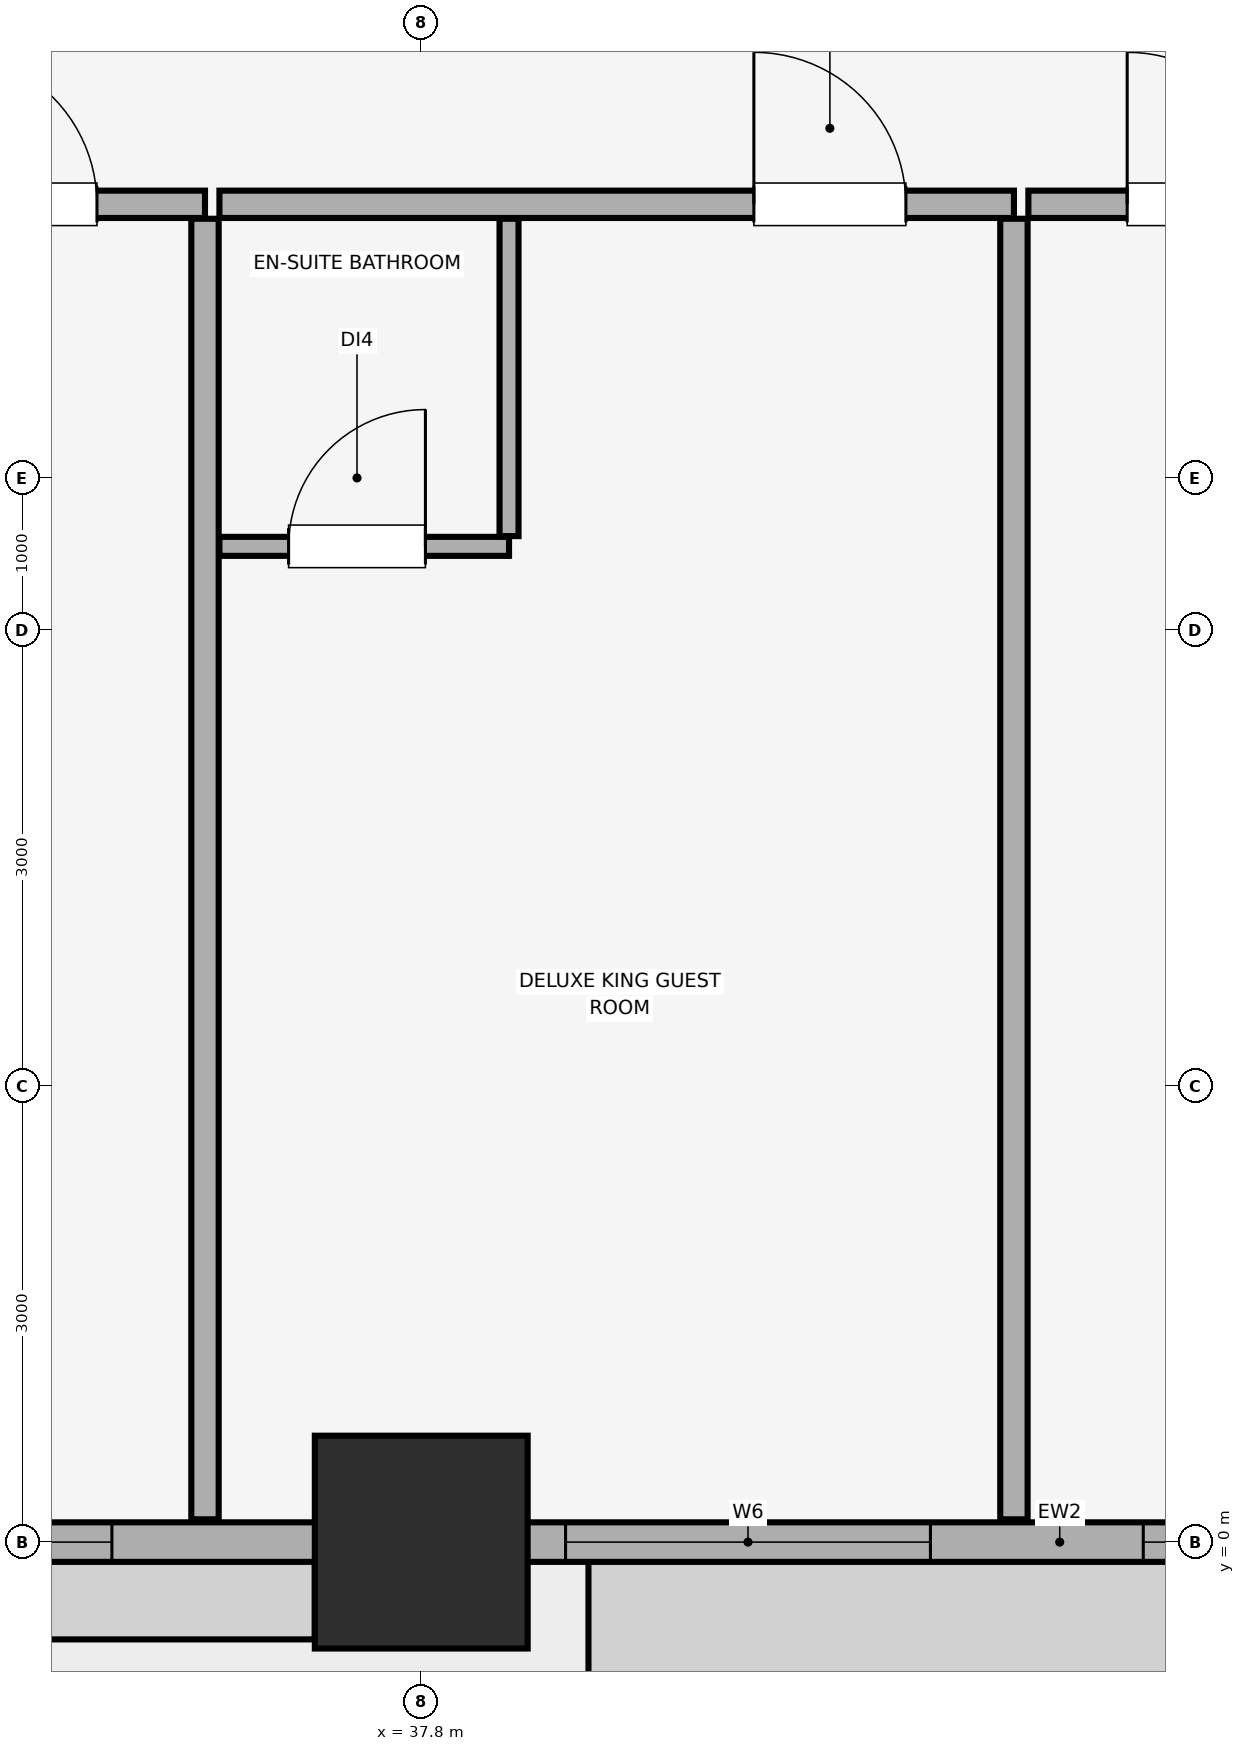
"""IFC4 building model, lengths in metres.
Left out: names, types, materials, properties, quantities, classifications, styles, units other than length and angle.
Written with IfcOpenShell. Run it as: python <this file> out.ifc"""

import sys

from ifc_helpers import new_model, si_unit, direction, frame, frame_2d, origin, origin_2d, place, context, subcontext, project, spatial, rectangle, extrude, element, fill, save


model = new_model("IFC4")
c1 = context("Model", 3, precision=1e-05, world=origin(), true_north=direction((0.0, 1.0)))
c2 = subcontext(c1, "Body", "Model", "MODEL_VIEW")
j1 = project(units=[si_unit("LENGTHUNIT", "METRE"), si_unit("PLANEANGLEUNIT", "RADIAN")], contexts=[c1])
p1 = place(None, origin())
s1 = spatial("IfcSite", under=j1, at=p1, CompositionType="ELEMENT")
p2 = place(p1, origin())
s2 = spatial("IfcBuilding", under=s1, at=p2, CompositionType="ELEMENT")
p3 = place(p2, frame((0.0, 0.0, 31.4)))
s3 = spatial("IfcBuildingStorey", under=s2, at=p3, CompositionType="ELEMENT", Elevation=31.4)
p4 = place(p3, frame((37.8, 0.0, 0.0), z_axis=(0.0, 0.0, 1.0), x_axis=(1.0, 0.0, 0.0)))
e1 = element("IfcColumn", 1, at=p4, inside=s3, PredefinedType="COLUMN", context=c2, shape_type="SweptSolid", body=[
    extrude(rectangle(XDim=1.4, YDim=1.4, at=origin_2d()), origin(), (0.0, 0.0, 1.0), 3.51),
])
p5 = place(p3, frame((4.2, 0.0, 0.0), z_axis=(0.0, 0.0, 1.0), x_axis=(1.0, 0.0, 0.0)))
e2 = element("IfcWall", 2, at=p5, inside=s3, PredefinedType="SOLIDWALL", context=c2, shape_type="SweptSolid", body=[
    extrude(rectangle(XDim=75.6, YDim=0.26, at=frame_2d((37.8, 0.0))), origin(), (0.0, 0.0, 1.0), 2.56),
])
p6 = place(p5, frame((13.517, 0.0, 0.0)))
e3 = element("IfcOpeningElement", 3, at=p6, cuts=e2, PredefinedType="OPENING", context=c2, shape_type="SweptSolid", body=[
    extrude(rectangle(XDim=1.1, YDim=2.15, at=frame_2d((0.55, 1.075))), frame((0.0, 0.14, 0.0), z_axis=(0.0, -1.0, 0.0), x_axis=(1.0, 0.0, 0.0)), (0.0, 0.0, 1.0), 0.28),
])
p7 = place(p5, frame((28.183, 0.0, 0.0)))
e4 = element("IfcOpeningElement", 4, at=p7, cuts=e2, PredefinedType="OPENING", context=c2, shape_type="SweptSolid", body=[
    extrude(rectangle(XDim=1.1, YDim=2.15, at=frame_2d((0.55, 1.075))), frame((0.0, 0.14, 0.0), z_axis=(0.0, -1.0, 0.0), x_axis=(1.0, 0.0, 0.0)), (0.0, 0.0, 1.0), 0.28),
])
p8 = place(p5, frame((60.983, 0.0, 0.0)))
e5 = element("IfcOpeningElement", 5, at=p8, cuts=e2, PredefinedType="OPENING", context=c2, shape_type="SweptSolid", body=[
    extrude(rectangle(XDim=1.1, YDim=2.15, at=frame_2d((0.55, 1.075))), frame((0.0, 0.14, 0.0), z_axis=(0.0, -1.0, 0.0), x_axis=(1.0, 0.0, 0.0)), (0.0, 0.0, 1.0), 0.28),
])
p9 = place(p5, frame((1.035, 0.0, 0.85)))
e6 = element("IfcOpeningElement", 6, at=p9, cuts=e2, PredefinedType="OPENING", context=c2, shape_type="SweptSolid", body=[
    extrude(rectangle(XDim=2.4, YDim=1.5, at=frame_2d((1.2, 0.75))), frame((0.0, 0.14, 0.0), z_axis=(0.0, -1.0, 0.0), x_axis=(1.0, 0.0, 0.0)), (0.0, 0.0, 1.0), 0.28),
])
p10 = place(p5, frame((7.031, 0.0, 0.85)))
e7 = element("IfcOpeningElement", 7, at=p10, cuts=e2, PredefinedType="OPENING", context=c2, shape_type="SweptSolid", body=[
    extrude(rectangle(XDim=2.4, YDim=1.5, at=frame_2d((1.2, 0.75))), frame((0.0, 0.14, 0.0), z_axis=(0.0, -1.0, 0.0), x_axis=(1.0, 0.0, 0.0)), (0.0, 0.0, 1.0), 0.28),
])
p11 = place(p5, frame((16.757, 0.0, 0.85)))
e8 = element("IfcOpeningElement", 8, at=p11, cuts=e2, PredefinedType="OPENING", context=c2, shape_type="SweptSolid", body=[
    extrude(rectangle(XDim=1.5, YDim=1.4, at=frame_2d((0.75, 0.7))), frame((0.0, 0.14, 0.0), z_axis=(0.0, -1.0, 0.0), x_axis=(1.0, 0.0, 0.0)), (0.0, 0.0, 1.0), 0.28),
])
p12 = place(p5, frame((22.567, 0.0, 0.85)))
e9 = element("IfcOpeningElement", 9, at=p12, cuts=e2, PredefinedType="OPENING", context=c2, shape_type="SweptSolid", body=[
    extrude(rectangle(XDim=2.4, YDim=1.5, at=frame_2d((1.2, 0.75))), frame((0.0, 0.14, 0.0), z_axis=(0.0, -1.0, 0.0), x_axis=(1.0, 0.0, 0.0)), (0.0, 0.0, 1.0), 0.28),
])
p13 = place(p5, frame((30.065, 0.0, 0.85)))
e10 = element("IfcOpeningElement", 10, at=p13, cuts=e2, PredefinedType="OPENING", context=c2, shape_type="SweptSolid", body=[
    extrude(rectangle(XDim=1.5, YDim=1.4, at=frame_2d((0.75, 0.7))), frame((0.0, 0.14, 0.0), z_axis=(0.0, -1.0, 0.0), x_axis=(1.0, 0.0, 0.0)), (0.0, 0.0, 1.0), 0.28),
])
p14 = place(p5, frame((34.55, 0.0, 0.85)))
e11 = element("IfcOpeningElement", 11, at=p14, cuts=e2, PredefinedType="OPENING", context=c2, shape_type="SweptSolid", body=[
    extrude(rectangle(XDim=2.4, YDim=1.5, at=frame_2d((1.2, 0.75))), frame((0.0, 0.14, 0.0), z_axis=(0.0, -1.0, 0.0), x_axis=(1.0, 0.0, 0.0)), (0.0, 0.0, 1.0), 0.28),
])
p15 = place(p5, frame((38.35, 0.0, 0.85)))
e12 = element("IfcOpeningElement", 12, at=p15, cuts=e2, PredefinedType="OPENING", context=c2, shape_type="SweptSolid", body=[
    extrude(rectangle(XDim=2.4, YDim=1.5, at=frame_2d((1.2, 0.75))), frame((0.0, 0.14, 0.0), z_axis=(0.0, -1.0, 0.0), x_axis=(1.0, 0.0, 0.0)), (0.0, 0.0, 1.0), 0.28),
])
p16 = place(p5, frame((44.281, 0.0, 0.85)))
e13 = element("IfcOpeningElement", 13, at=p16, cuts=e2, PredefinedType="OPENING", context=c2, shape_type="SweptSolid", body=[
    extrude(rectangle(XDim=2.4, YDim=1.5, at=frame_2d((1.2, 0.75))), frame((0.0, 0.14, 0.0), z_axis=(0.0, -1.0, 0.0), x_axis=(1.0, 0.0, 0.0)), (0.0, 0.0, 1.0), 0.28),
])
p17 = place(p5, frame((50.332, 0.0, 0.85)))
e14 = element("IfcOpeningElement", 14, at=p17, cuts=e2, PredefinedType="OPENING", context=c2, shape_type="SweptSolid", body=[
    extrude(rectangle(XDim=2.4, YDim=1.5, at=frame_2d((1.2, 0.75))), frame((0.0, 0.14, 0.0), z_axis=(0.0, -1.0, 0.0), x_axis=(1.0, 0.0, 0.0)), (0.0, 0.0, 1.0), 0.28),
])
p18 = place(p5, frame((53.981, 0.0, 0.85)))
e15 = element("IfcOpeningElement", 15, at=p18, cuts=e2, PredefinedType="OPENING", context=c2, shape_type="SweptSolid", body=[
    extrude(rectangle(XDim=1.5, YDim=1.4, at=frame_2d((0.75, 0.7))), frame((0.0, 0.14, 0.0), z_axis=(0.0, -1.0, 0.0), x_axis=(1.0, 0.0, 0.0)), (0.0, 0.0, 1.0), 0.28),
])
p19 = place(p5, frame((64.759, 0.0, 0.85)))
e16 = element("IfcOpeningElement", 16, at=p19, cuts=e2, PredefinedType="OPENING", context=c2, shape_type="SweptSolid", body=[
    extrude(rectangle(XDim=1.5, YDim=1.4, at=frame_2d((0.75, 0.7))), frame((0.0, 0.14, 0.0), z_axis=(0.0, -1.0, 0.0), x_axis=(1.0, 0.0, 0.0)), (0.0, 0.0, 1.0), 0.28),
])
p20 = place(p5, frame((67.509, 0.0, 0.85)))
e17 = element("IfcOpeningElement", 17, at=p20, cuts=e2, PredefinedType="OPENING", context=c2, shape_type="SweptSolid", body=[
    extrude(rectangle(XDim=2.4, YDim=1.5, at=frame_2d((1.2, 0.75))), frame((0.0, 0.14, 0.0), z_axis=(0.0, -1.0, 0.0), x_axis=(1.0, 0.0, 0.0)), (0.0, 0.0, 1.0), 0.28),
])
p21 = place(p5, frame((72.165, 0.0, 0.85)))
e18 = element("IfcOpeningElement", 18, at=p21, cuts=e2, PredefinedType="OPENING", context=c2, shape_type="SweptSolid", body=[
    extrude(rectangle(XDim=2.4, YDim=1.5, at=frame_2d((1.2, 0.75))), frame((0.0, 0.14, 0.0), z_axis=(0.0, -1.0, 0.0), x_axis=(1.0, 0.0, 0.0)), (0.0, 0.0, 1.0), 0.28),
])
p22 = place(p3, frame((31.151, 8.8, 0.0), z_axis=(0.0, 0.0, 1.0), x_axis=(1.0, 0.0, 0.0)))
e19 = element("IfcWall", 19, at=p22, inside=s3, PredefinedType="PARTITIONING", context=c2, shape_type="SweptSolid", body=[
    extrude(rectangle(XDim=5.226, YDim=0.18, at=frame_2d((2.613, 0.0))), origin(), (0.0, 0.0, 1.0), 3.51),
])
p23 = place(p22, frame((3.516, 0.0, 0.0)))
e20 = element("IfcOpeningElement", 20, at=p23, cuts=e19, PredefinedType="OPENING", context=c2, shape_type="SweptSolid", body=[
    extrude(rectangle(XDim=1.0, YDim=2.15, at=frame_2d((0.5, 1.075))), frame((0.0, 0.1, 0.0), z_axis=(0.0, -1.0, 0.0), x_axis=(1.0, 0.0, 0.0)), (0.0, 0.0, 1.0), 0.2),
])
p24 = place(p3, frame((36.377, 0.15, 0.0), z_axis=(0.0, 0.0, 1.0), x_axis=(0.0, 1.0, 0.0)))
e21 = element("IfcWall", 21, at=p24, inside=s3, PredefinedType="PARTITIONING", context=c2, shape_type="SweptSolid", body=[
    extrude(rectangle(XDim=8.555, YDim=0.18, at=frame_2d((4.278, 0.0))), origin(), (0.0, 0.0, 1.0), 3.51),
])
p25 = place(p3, frame((36.472, 8.8, 0.0), z_axis=(0.0, 0.0, 1.0), x_axis=(1.0, 0.0, 0.0)))
e22 = element("IfcWall", 22, at=p25, inside=s3, PredefinedType="PARTITIONING", context=c2, shape_type="SweptSolid", body=[
    extrude(rectangle(XDim=5.226, YDim=0.18, at=frame_2d((2.613, 0.0))), origin(), (0.0, 0.0, 1.0), 3.51),
])
p26 = place(p25, frame((3.516, 0.0, 0.0)))
e23 = element("IfcOpeningElement", 23, at=p26, cuts=e22, PredefinedType="OPENING", context=c2, shape_type="SweptSolid", body=[
    extrude(rectangle(XDim=1.0, YDim=2.15, at=frame_2d((0.5, 1.075))), frame((0.0, 0.1, 0.0), z_axis=(0.0, -1.0, 0.0), x_axis=(1.0, 0.0, 0.0)), (0.0, 0.0, 1.0), 0.2),
])
p27 = place(p3, frame((41.699, 0.15, 0.0), z_axis=(0.0, 0.0, 1.0), x_axis=(0.0, 1.0, 0.0)))
e24 = element("IfcWall", 24, at=p27, inside=s3, PredefinedType="PARTITIONING", context=c2, shape_type="SweptSolid", body=[
    extrude(rectangle(XDim=8.555, YDim=0.18, at=frame_2d((4.278, 0.0))), origin(), (0.0, 0.0, 1.0), 3.51),
])
p28 = place(p3, frame((36.472, 6.55, 0.0), z_axis=(0.0, 0.0, 1.0), x_axis=(1.0, 0.0, 0.0)))
e25 = element("IfcWall", 25, at=p28, inside=s3, PredefinedType="PARTITIONING", context=c2, shape_type="SweptSolid", body=[
    extrude(rectangle(XDim=1.905, YDim=0.125, at=frame_2d((0.953, 0.0))), origin(), (0.0, 0.0, 1.0), 3.51),
])
p29 = place(p28, frame((0.455, 0.0, 0.0)))
e26 = element("IfcOpeningElement", 26, at=p29, cuts=e25, PredefinedType="OPENING", context=c2, shape_type="SweptSolid", body=[
    extrude(rectangle(XDim=0.9, YDim=2.1, at=frame_2d((0.45, 1.05))), frame((0.0, 0.073, 0.0), z_axis=(0.0, -1.0, 0.0), x_axis=(1.0, 0.0, 0.0)), (0.0, 0.0, 1.0), 0.145),
])
p30 = place(p3, frame((38.377, 6.617, 0.0), z_axis=(0.0, 0.0, 1.0), x_axis=(0.0, 1.0, 0.0)))
e27 = element("IfcWall", 27, at=p30, inside=s3, PredefinedType="PARTITIONING", context=c2, shape_type="SweptSolid", body=[
    extrude(rectangle(XDim=2.088, YDim=0.125, at=frame_2d((1.044, 0.0))), origin(), (0.0, 0.0, 1.0), 3.51),
])
p31 = place(p3, frame((41.794, 8.8, 0.0), z_axis=(0.0, 0.0, 1.0), x_axis=(1.0, 0.0, 0.0)))
e28 = element("IfcWall", 28, at=p31, inside=s3, PredefinedType="PARTITIONING", context=c2, shape_type="SweptSolid", body=[
    extrude(rectangle(XDim=5.226, YDim=0.18, at=frame_2d((2.613, 0.0))), origin(), (0.0, 0.0, 1.0), 3.51),
])
p32 = place(p31, frame((0.65, 0.0, 0.0)))
e29 = element("IfcOpeningElement", 29, at=p32, cuts=e28, PredefinedType="OPENING", context=c2, shape_type="SweptSolid", body=[
    extrude(rectangle(XDim=1.0, YDim=2.15, at=frame_2d((0.5, 1.075))), frame((0.0, 0.1, 0.0), z_axis=(0.0, -1.0, 0.0), x_axis=(1.0, 0.0, 0.0)), (0.0, 0.0, 1.0), 0.2),
])
p33 = place(p13, origin())
e30 = element("IfcWindow", 30, at=p33, inside=s3, PartitioningType="SINGLE_PANEL", PredefinedType="WINDOW", context=c2, shape_type="SweptSolid", body=[
    extrude(rectangle(XDim=1.5, YDim=1.4, at=frame_2d((0.75, 0.7))), frame((0.0, 0.03, 0.0), z_axis=(0.0, -1.0, 0.0), x_axis=(1.0, 0.0, 0.0)), (0.0, 0.0, 1.0), 0.06),
])
fill(e10, e30)
p34 = place(p14, origin())
e31 = element("IfcWindow", 31, at=p34, inside=s3, PartitioningType="SINGLE_PANEL", PredefinedType="WINDOW", context=c2, shape_type="SweptSolid", body=[
    extrude(rectangle(XDim=2.4, YDim=1.5, at=frame_2d((1.2, 0.75))), frame((0.0, 0.03, 0.0), z_axis=(0.0, -1.0, 0.0), x_axis=(1.0, 0.0, 0.0)), (0.0, 0.0, 1.0), 0.06),
])
fill(e11, e31)
p35 = place(p15, origin())
e32 = element("IfcWindow", 32, at=p35, inside=s3, PartitioningType="SINGLE_PANEL", PredefinedType="WINDOW", context=c2, shape_type="SweptSolid", body=[
    extrude(rectangle(XDim=2.4, YDim=1.5, at=frame_2d((1.2, 0.75))), frame((0.0, 0.03, 0.0), z_axis=(0.0, -1.0, 0.0), x_axis=(1.0, 0.0, 0.0)), (0.0, 0.0, 1.0), 0.06),
])
fill(e12, e32)
p36 = place(p23, origin())
e33 = element("IfcDoor", 33, at=p36, inside=s3, OperationType="SINGLE_SWING_LEFT", PredefinedType="DOOR", context=c2, shape_type="SweptSolid", body=[
    extrude(rectangle(XDim=1.0, YDim=2.15, at=frame_2d((0.5, 1.075))), frame((0.0, 0.025, 0.0), z_axis=(0.0, -1.0, 0.0), x_axis=(1.0, 0.0, 0.0)), (0.0, 0.0, 1.0), 0.05),
])
fill(e20, e33)
p37 = place(p26, origin())
e34 = element("IfcDoor", 34, at=p37, inside=s3, OperationType="SINGLE_SWING_LEFT", PredefinedType="DOOR", context=c2, shape_type="SweptSolid", body=[
    extrude(rectangle(XDim=1.0, YDim=2.15, at=frame_2d((0.5, 1.075))), frame((0.0, 0.025, 0.0), z_axis=(0.0, -1.0, 0.0), x_axis=(1.0, 0.0, 0.0)), (0.0, 0.0, 1.0), 0.05),
])
fill(e23, e34)
p38 = place(p29, origin())
e35 = element("IfcDoor", 35, at=p38, inside=s3, OperationType="SINGLE_SWING_RIGHT", PredefinedType="DOOR", context=c2, shape_type="SweptSolid", body=[
    extrude(rectangle(XDim=0.9, YDim=2.1, at=frame_2d((0.45, 1.05))), frame((0.0, 0.025, 0.0), z_axis=(0.0, -1.0, 0.0), x_axis=(1.0, 0.0, 0.0)), (0.0, 0.0, 1.0), 0.05),
])
fill(e26, e35)
p39 = place(p32, origin())
e36 = element("IfcDoor", 36, at=p39, inside=s3, OperationType="SINGLE_SWING_LEFT", PredefinedType="DOOR", context=c2, shape_type="SweptSolid", body=[
    extrude(rectangle(XDim=1.0, YDim=2.15, at=frame_2d((0.5, 1.075))), frame((0.0, 0.025, 0.0), z_axis=(0.0, -1.0, 0.0), x_axis=(1.0, 0.0, 0.0)), (0.0, 0.0, 1.0), 0.05),
])
fill(e29, e36)
save(model, sys.argv[1])
